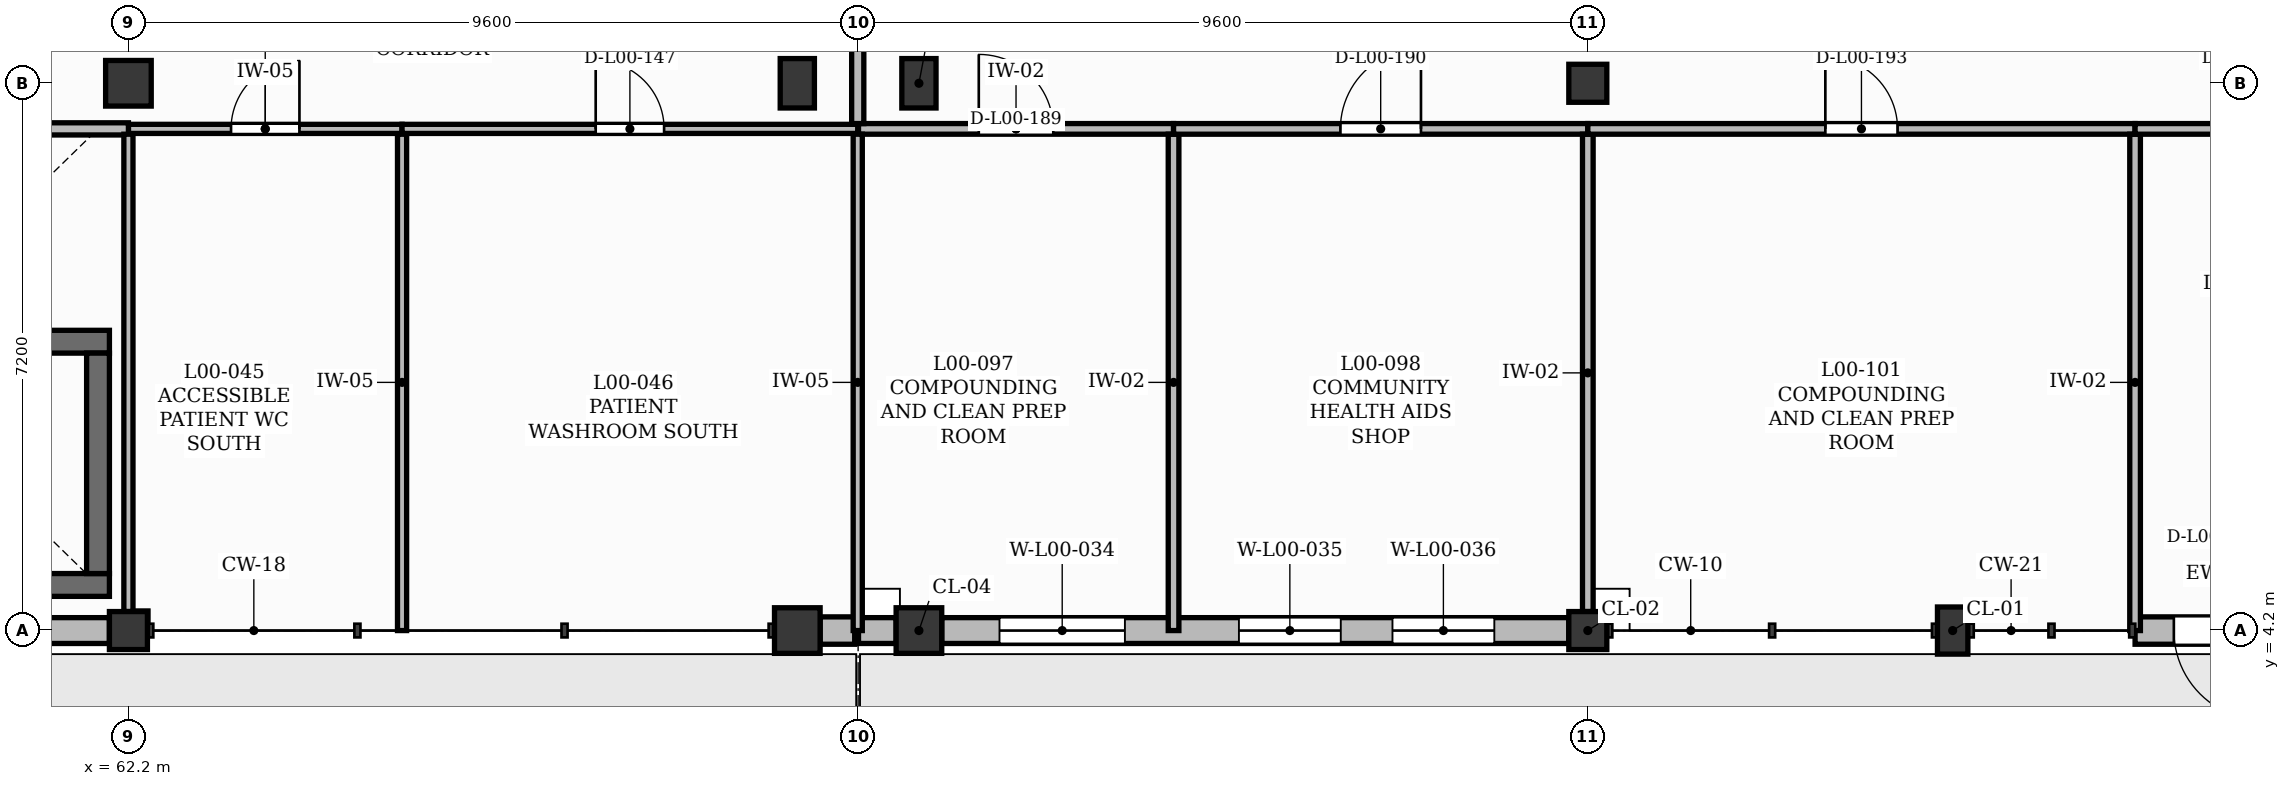
"""IFC4 building model, lengths in metres.
Left out: names, types, materials, properties, quantities, classifications, styles, units other than length and angle.
Written with IfcOpenShell. Run it as: python <this file> out.ifc"""

import sys

from ifc_helpers import new_model, si_unit, direction, frame, frame_2d, origin, origin_2d, place, context, subcontext, project, spatial, rectangle, extrude, element, fill, save


model = new_model("IFC4")
c1 = context("Model", 3, precision=1e-05, world=origin(), true_north=direction((0.0, 1.0)))
c2 = subcontext(c1, "Body", "Model", "MODEL_VIEW")
j1 = project(units=[si_unit("LENGTHUNIT", "METRE"), si_unit("PLANEANGLEUNIT", "RADIAN")], contexts=[c1])
p1 = place(None, origin())
s1 = spatial("IfcSite", under=j1, at=p1, CompositionType="ELEMENT")
p2 = place(p1, origin())
s2 = spatial("IfcBuilding", under=s1, at=p2, CompositionType="ELEMENT")
p3 = place(p2, origin())
s3 = spatial("IfcBuildingStorey", under=s2, at=p3, CompositionType="ELEMENT", Elevation=0.0)
p4 = place(p3, frame((72.6, 4.2, 0.0), z_axis=(0.0, 0.0, 1.0), x_axis=(1.0, 0.0, 0.0)))
e1 = element("IfcColumn", 1, at=p4, inside=s3, PredefinedType="COLUMN", context=c2, shape_type="SweptSolid", body=[
    extrude(rectangle(XDim=0.6, YDim=0.6, at=origin_2d()), origin(), (0.0, 0.0, 1.0), 4.2),
])
p5 = place(p3, frame((72.6, 11.4, 0.0), z_axis=(0.0, 0.0, 1.0), x_axis=(1.0, 0.0, 0.0)))
e2 = element("IfcColumn", 2, at=p5, inside=s3, PredefinedType="COLUMN", context=c2, shape_type="SweptSolid", body=[
    extrude(rectangle(XDim=0.45, YDim=0.65, at=origin_2d()), origin(), (0.0, 0.0, 1.0), 4.2),
])
for number, where, z_axis, x_axis in (
    (3, (81.4, 4.2, 0.0), (0.0, 0.0, 1.0), (1.0, 0.0, 0.0)),
    (4, (81.4, 11.4, 0.0), (0.0, 0.0, 1.0), (1.0, 0.0, 0.0)),
    (5, (62.2, 4.2, 0.0), (0.0, 0.0, 1.0), (1.0, 0.0, 0.0)),
):
    element("IfcColumn", number, at=place(p3, frame(where, z_axis=z_axis, x_axis=x_axis)), inside=s3, PredefinedType="COLUMN", context=c2, shape_type="SweptSolid", body=[
        extrude(rectangle(XDim=0.5, YDim=0.5, at=origin_2d()), origin(), (0.0, 0.0, 1.0), 4.2),
    ])
for number, where, z_axis, x_axis in (
    (6, (62.2, 11.4, 0.0), (0.0, 0.0, 1.0), (1.0, 0.0, 0.0)),
    (7, (71.0, 4.2, 0.0), (0.0, 0.0, 1.0), (1.0, 0.0, 0.0)),
):
    element("IfcColumn", number, at=place(p3, frame(where, z_axis=z_axis, x_axis=x_axis)), inside=s3, PredefinedType="COLUMN", context=c2, shape_type="SweptSolid", body=[
        extrude(rectangle(XDim=0.6, YDim=0.6, at=origin_2d()), origin(), (0.0, 0.0, 1.0), 4.2),
    ])
p6 = place(p3, frame((71.0, 11.4, 0.0), z_axis=(0.0, 0.0, 1.0), x_axis=(1.0, 0.0, 0.0)))
e8 = element("IfcColumn", 8, at=p6, inside=s3, PredefinedType="COLUMN", context=c2, shape_type="SweptSolid", body=[
    extrude(rectangle(XDim=0.45, YDim=0.65, at=origin_2d()), origin(), (0.0, 0.0, 1.0), 4.2),
])
p7 = place(p3, frame((86.2, 4.2, 0.0), z_axis=(0.0, 0.0, 1.0), x_axis=(1.0, 0.0, 0.0)))
e9 = element("IfcColumn", 9, at=p7, inside=s3, PredefinedType="PILASTER", context=c2, shape_type="SweptSolid", body=[
    extrude(rectangle(XDim=0.4, YDim=0.62, at=origin_2d()), origin(), (0.0, 0.0, 1.0), 4.2),
])
p8 = place(p3, frame((58.775, 4.2, 0.0), z_axis=(0.0, 0.0, 1.0), x_axis=(1.0, 0.0, 0.0)))
e10 = element("IfcWall", 10, at=p8, inside=s3, PredefinedType="SOLIDWALL", context=c2, shape_type="SweptSolid", body=[
    extrude(rectangle(XDim=3.175, YDim=0.34, at=frame_2d((1.587, 0.0))), origin(), (0.0, 0.0, 1.0), 3.68),
])
p9 = place(p3, frame((71.3, 4.2, 0.0), z_axis=(0.0, 0.0, 1.0), x_axis=(1.0, 0.0, 0.0)))
e11 = element("IfcWall", 11, at=p9, inside=s3, PredefinedType="SOLIDWALL", context=c2, shape_type="SweptSolid", body=[
    extrude(rectangle(XDim=0.455, YDim=0.36, at=frame_2d((0.228, 0.0))), origin(), (0.0, 0.0, 1.0), 4.2),
])
p10 = place(p3, frame((71.805, 4.2, 0.0), z_axis=(0.0, 0.0, 1.0), x_axis=(1.0, 0.0, 0.0)))
e12 = element("IfcWall", 12, at=p10, inside=s3, PredefinedType="SOLIDWALL", context=c2, shape_type="SweptSolid", body=[
    extrude(rectangle(XDim=0.495, YDim=0.34, at=frame_2d((0.248, 0.0))), origin(), (0.0, 0.0, 1.0), 4.2),
])
p11 = place(p3, frame((72.9, 4.2, 0.0), z_axis=(0.0, 0.0, 1.0), x_axis=(1.0, 0.0, 0.0)))
e13 = element("IfcWall", 13, at=p11, inside=s3, PredefinedType="SOLIDWALL", context=c2, shape_type="SweptSolid", body=[
    extrude(rectangle(XDim=8.25, YDim=0.34, at=frame_2d((4.125, 0.0))), origin(), (0.0, 0.0, 1.0), 3.68),
])
p12 = place(p11, frame((0.76, 0.0, 1.35)))
e14 = element("IfcOpeningElement", 14, at=p12, cuts=e13, PredefinedType="OPENING", context=c2, shape_type="SweptSolid", body=[
    extrude(rectangle(XDim=1.65, YDim=1.4, at=frame_2d((0.825, 0.7))), frame((0.0, 0.18, 0.0), z_axis=(0.0, -1.0, 0.0), x_axis=(1.0, 0.0, 0.0)), (0.0, 0.0, 1.0), 0.36),
])
p13 = place(p11, frame((3.91, 0.0, 1.0)))
e15 = element("IfcOpeningElement", 15, at=p13, cuts=e13, PredefinedType="OPENING", context=c2, shape_type="SweptSolid", body=[
    extrude(rectangle(XDim=1.34, YDim=1.95, at=frame_2d((0.67, 0.975))), frame((0.0, 0.18, 0.0), z_axis=(0.0, -1.0, 0.0), x_axis=(1.0, 0.0, 0.0)), (0.0, 0.0, 1.0), 0.36),
])
p14 = place(p11, frame((5.93, 0.0, 1.0)))
e16 = element("IfcOpeningElement", 16, at=p14, cuts=e13, PredefinedType="OPENING", context=c2, shape_type="SweptSolid", body=[
    extrude(rectangle(XDim=1.34, YDim=1.95, at=frame_2d((0.67, 0.975))), frame((0.0, 0.18, 0.0), z_axis=(0.0, -1.0, 0.0), x_axis=(1.0, 0.0, 0.0)), (0.0, 0.0, 1.0), 0.36),
])
p15 = place(p3, frame((88.6, 4.2, 0.0), z_axis=(0.0, 0.0, 1.0), x_axis=(1.0, 0.0, 0.0)))
e17 = element("IfcWall", 17, at=p15, inside=s3, PredefinedType="SOLIDWALL", context=c2, shape_type="SweptSolid", body=[
    extrude(rectangle(XDim=2.175, YDim=0.36, at=frame_2d((1.087, 0.0))), origin(), (0.0, 0.0, 1.0), 3.68),
])
p16 = place(p15, frame((0.51, 0.0, 0.0)))
e18 = element("IfcOpeningElement", 18, at=p16, cuts=e17, PredefinedType="OPENING", context=c2, shape_type="SweptSolid", body=[
    extrude(rectangle(XDim=1.18, YDim=2.2, at=frame_2d((0.59, 1.1))), frame((0.0, 0.19, 0.0), z_axis=(0.0, -1.0, 0.0), x_axis=(1.0, 0.0, 0.0)), (0.0, 0.0, 1.0), 0.38),
])
for number, where, z_axis, x_axis in (
    (19, (55.25, 4.8, 0.0), (0.0, 0.0, 1.0), (1.0, 0.0, 0.0)),
    (20, (55.25, 8.0, 0.0), (0.0, 0.0, 1.0), (1.0, 0.0, 0.0)),
):
    element("IfcWall", number, at=place(p3, frame(where, z_axis=z_axis, x_axis=x_axis)), inside=s3, PredefinedType="SHEAR", context=c2, shape_type="SweptSolid", body=[
        extrude(rectangle(XDim=6.7, YDim=0.3, at=frame_2d((3.35, 0.0))), origin(), (0.0, 0.0, 1.0), 4.25),
    ])
p17 = place(p3, frame((61.8, 4.95, 0.0), z_axis=(0.0, 0.0, 1.0), x_axis=(0.0, 1.0, 0.0)))
e21 = element("IfcWall", 21, at=p17, inside=s3, PredefinedType="SHEAR", context=c2, shape_type="SweptSolid", body=[
    extrude(rectangle(XDim=2.9, YDim=0.3, at=frame_2d((1.45, 0.0))), origin(), (0.0, 0.0, 1.0), 4.25),
])
p18 = place(p3, frame((62.2, 10.8, 0.0), z_axis=(0.0, 0.0, 1.0), x_axis=(1.0, 0.0, 0.0)))
e22 = element("IfcWall", 22, at=p18, inside=s3, PredefinedType="PLUMBINGWALL", context=c2, shape_type="SweptSolid", body=[
    extrude(rectangle(XDim=3.6, YDim=0.12, at=frame_2d((1.8, 0.0))), origin(), (0.0, 0.0, 1.0), 4.18),
])
p19 = place(p18, frame((1.35, 0.0, 0.0)))
e23 = element("IfcOpeningElement", 23, at=p19, cuts=e22, PredefinedType="OPENING", context=c2, shape_type="SweptSolid", body=[
    extrude(rectangle(XDim=0.9, YDim=2.1, at=frame_2d((0.45, 1.05))), frame((0.0, 0.07, 0.0), z_axis=(0.0, -1.0, 0.0), x_axis=(1.0, 0.0, 0.0)), (0.0, 0.0, 1.0), 0.14),
])
p20 = place(p3, frame((65.8, 4.2, 0.0), z_axis=(0.0, 0.0, 1.0), x_axis=(0.0, 1.0, 0.0)))
e24 = element("IfcWall", 24, at=p20, inside=s3, PredefinedType="PLUMBINGWALL", context=c2, shape_type="SweptSolid", body=[
    extrude(rectangle(XDim=6.53, YDim=0.12, at=frame_2d((3.265, 0.0))), origin(), (0.0, 0.0, 1.0), 4.18),
])
p21 = place(p3, frame((65.8, 10.8, 0.0), z_axis=(0.0, 0.0, 1.0), x_axis=(1.0, 0.0, 0.0)))
e25 = element("IfcWall", 25, at=p21, inside=s3, PredefinedType="PLUMBINGWALL", context=c2, shape_type="SweptSolid", body=[
    extrude(rectangle(XDim=5.995, YDim=0.12, at=frame_2d((2.998, 0.0))), origin(), (0.0, 0.0, 1.0), 4.18),
])
p22 = place(p21, frame((2.548, 0.0, 0.0)))
e26 = element("IfcOpeningElement", 26, at=p22, cuts=e25, PredefinedType="OPENING", context=c2, shape_type="SweptSolid", body=[
    extrude(rectangle(XDim=0.9, YDim=2.1, at=frame_2d((0.45, 1.05))), frame((0.0, 0.07, 0.0), z_axis=(0.0, -1.0, 0.0), x_axis=(1.0, 0.0, 0.0)), (0.0, 0.0, 1.0), 0.14),
])
p23 = place(p3, frame((71.805, 10.8, 0.0), z_axis=(0.0, 0.0, 1.0), x_axis=(1.0, 0.0, 0.0)))
e27 = element("IfcWall", 27, at=p23, inside=s3, PredefinedType="PARTITIONING", context=c2, shape_type="SweptSolid", body=[
    extrude(rectangle(XDim=4.145, YDim=0.14, at=frame_2d((2.073, 0.0))), origin(), (0.0, 0.0, 1.0), 4.18),
])
p24 = place(p23, frame((1.583, 0.0, 0.0)))
e28 = element("IfcOpeningElement", 28, at=p24, cuts=e27, PredefinedType="OPENING", context=c2, shape_type="SweptSolid", body=[
    extrude(rectangle(XDim=0.98, YDim=2.15, at=frame_2d((0.49, 1.075))), frame((0.0, 0.08, 0.0), z_axis=(0.0, -1.0, 0.0), x_axis=(1.0, 0.0, 0.0)), (0.0, 0.0, 1.0), 0.16),
])
p25 = place(p3, frame((75.95, 4.2, 0.0), z_axis=(0.0, 0.0, 1.0), x_axis=(0.0, 1.0, 0.0)))
e29 = element("IfcWall", 29, at=p25, inside=s3, PredefinedType="PARTITIONING", context=c2, shape_type="SweptSolid", body=[
    extrude(rectangle(XDim=6.53, YDim=0.14, at=frame_2d((3.265, 0.0))), origin(), (0.0, 0.0, 1.0), 4.18),
])
p26 = place(p3, frame((75.95, 10.8, 0.0), z_axis=(0.0, 0.0, 1.0), x_axis=(1.0, 0.0, 0.0)))
e30 = element("IfcWall", 30, at=p26, inside=s3, PredefinedType="PARTITIONING", context=c2, shape_type="SweptSolid", body=[
    extrude(rectangle(XDim=5.45, YDim=0.14, at=frame_2d((2.725, 0.0))), origin(), (0.0, 0.0, 1.0), 4.18),
])
p27 = place(p26, frame((2.195, 0.0, 0.0)))
e31 = element("IfcOpeningElement", 31, at=p27, cuts=e30, PredefinedType="OPENING", context=c2, shape_type="SweptSolid", body=[
    extrude(rectangle(XDim=1.06, YDim=2.15, at=frame_2d((0.53, 1.075))), frame((0.0, 0.08, 0.0), z_axis=(0.0, -1.0, 0.0), x_axis=(1.0, 0.0, 0.0)), (0.0, 0.0, 1.0), 0.16),
])
p28 = place(p3, frame((81.4, 4.45, 0.0), z_axis=(0.0, 0.0, 1.0), x_axis=(0.0, 1.0, 0.0)))
e32 = element("IfcWall", 32, at=p28, inside=s3, PredefinedType="PARTITIONING", context=c2, shape_type="SweptSolid", body=[
    extrude(rectangle(XDim=6.28, YDim=0.14, at=frame_2d((3.14, 0.0))), origin(), (0.0, 0.0, 1.0), 3.5),
])
p29 = place(p3, frame((81.4, 10.8, 0.0), z_axis=(0.0, 0.0, 1.0), x_axis=(1.0, 0.0, 0.0)))
e33 = element("IfcWall", 33, at=p29, inside=s3, PredefinedType="PARTITIONING", context=c2, shape_type="SweptSolid", body=[
    extrude(rectangle(XDim=7.2, YDim=0.14, at=frame_2d((3.6, 0.0))), origin(), (0.0, 0.0, 1.0), 4.18),
])
p30 = place(p29, frame((3.125, 0.0, 0.0)))
e34 = element("IfcOpeningElement", 34, at=p30, cuts=e33, PredefinedType="OPENING", context=c2, shape_type="SweptSolid", body=[
    extrude(rectangle(XDim=0.95, YDim=2.1, at=frame_2d((0.475, 1.05))), frame((0.0, 0.08, 0.0), z_axis=(0.0, -1.0, 0.0), x_axis=(1.0, 0.0, 0.0)), (0.0, 0.0, 1.0), 0.16),
])
p31 = place(p3, frame((88.6, 4.2, 0.0), z_axis=(0.0, 0.0, 1.0), x_axis=(0.0, 1.0, 0.0)))
e35 = element("IfcWall", 35, at=p31, inside=s3, PredefinedType="PARTITIONING", context=c2, shape_type="SweptSolid", body=[
    extrude(rectangle(XDim=6.53, YDim=0.14, at=frame_2d((3.265, 0.0))), origin(), (0.0, 0.0, 1.0), 3.9),
])
p32 = place(p3, frame((88.6, 10.8, 0.0), z_axis=(0.0, 0.0, 1.0), x_axis=(1.0, 0.0, 0.0)))
e36 = element("IfcWall", 36, at=p32, inside=s3, PredefinedType="PARTITIONING", context=c2, shape_type="SweptSolid", body=[
    extrude(rectangle(XDim=3.4, YDim=0.14, at=frame_2d((1.7, 0.0))), origin(), (0.0, 0.0, 1.0), 4.18),
])
p33 = place(p32, frame((1.03, 0.0, 0.0)))
e37 = element("IfcOpeningElement", 37, at=p33, cuts=e36, PredefinedType="OPENING", context=c2, shape_type="SweptSolid", body=[
    extrude(rectangle(XDim=0.9, YDim=2.1, at=frame_2d((0.45, 1.05))), frame((0.0, 0.08, 0.0), z_axis=(0.0, -1.0, 0.0), x_axis=(1.0, 0.0, 0.0)), (0.0, 0.0, 1.0), 0.16),
])
p34 = place(p3, frame((59.4, 10.8, 0.0), z_axis=(0.0, 0.0, 1.0), x_axis=(1.0, 0.0, 0.0)))
e38 = element("IfcWall", 38, at=p34, inside=s3, PredefinedType="PARTITIONING", context=c2, shape_type="SweptSolid", body=[
    extrude(rectangle(XDim=2.8, YDim=0.16, at=frame_2d((1.4, 0.0))), origin(), (0.0, 0.0, 1.0), 4.18),
])
p35 = place(p3, frame((71.795, 10.87, 0.0), z_axis=(0.0, 0.0, 1.0), x_axis=(0.0, 1.0, 0.0)))
e39 = element("IfcWall", 39, at=p35, inside=s3, PredefinedType="PARTITIONING", context=c2, shape_type="SweptSolid", body=[
    extrude(rectangle(XDim=2.46, YDim=0.16, at=frame_2d((1.23, 0.0))), origin(), (0.0, 0.0, 1.0), 4.18),
])
p36 = place(p3, frame((62.2, 4.45, 0.0), z_axis=(0.0, 0.0, 1.0), x_axis=(0.0, 1.0, 0.0)))
e40 = element("IfcWall", 40, at=p36, inside=s3, PredefinedType="PLUMBINGWALL", context=c2, shape_type="SweptSolid", body=[
    extrude(rectangle(XDim=6.28, YDim=0.12, at=frame_2d((3.14, 0.0))), origin(), (0.0, 0.0, 1.0), 3.5),
])
p37 = place(p3, frame((71.795, 4.2, 0.0), z_axis=(0.0, 0.0, 1.0), x_axis=(0.0, 1.0, 0.0)))
e41 = element("IfcWall", 41, at=p37, inside=s3, PredefinedType="PLUMBINGWALL", context=c2, shape_type="SweptSolid", body=[
    extrude(rectangle(XDim=6.53, YDim=0.12, at=frame_2d((3.265, 0.0))), origin(), (0.0, 0.0, 1.0), 4.18),
])
p38 = place(p12, origin())
e42 = element("IfcWindow", 42, at=p38, inside=s3, PartitioningType="DOUBLE_PANEL_VERTICAL", PredefinedType="WINDOW", context=c2, shape_type="SweptSolid", body=[
    extrude(rectangle(XDim=1.65, YDim=1.4, at=frame_2d((0.825, 0.7))), frame((0.0, 0.03, 0.0), z_axis=(0.0, -1.0, 0.0), x_axis=(1.0, 0.0, 0.0)), (0.0, 0.0, 1.0), 0.06),
])
fill(e14, e42)
p39 = place(p13, origin())
e43 = element("IfcWindow", 43, at=p39, inside=s3, PartitioningType="SINGLE_PANEL", PredefinedType="WINDOW", context=c2, shape_type="SweptSolid", body=[
    extrude(rectangle(XDim=1.34, YDim=1.95, at=frame_2d((0.67, 0.975))), frame((0.0, 0.03, 0.0), z_axis=(0.0, -1.0, 0.0), x_axis=(1.0, 0.0, 0.0)), (0.0, 0.0, 1.0), 0.06),
])
fill(e15, e43)
p40 = place(p14, origin())
e44 = element("IfcWindow", 44, at=p40, inside=s3, PartitioningType="SINGLE_PANEL", PredefinedType="WINDOW", context=c2, shape_type="SweptSolid", body=[
    extrude(rectangle(XDim=1.34, YDim=1.95, at=frame_2d((0.67, 0.975))), frame((0.0, 0.03, 0.0), z_axis=(0.0, -1.0, 0.0), x_axis=(1.0, 0.0, 0.0)), (0.0, 0.0, 1.0), 0.06),
])
fill(e16, e44)
p41 = place(p16, frame((1.18, 0.0, 0.0), z_axis=(0.0, 0.0, 1.0), x_axis=(-1.0, 0.0, 0.0)))
e45 = element("IfcDoor", 45, at=p41, inside=s3, OperationType="SINGLE_SWING_LEFT", PredefinedType="DOOR", context=c2, shape_type="SweptSolid", body=[
    extrude(rectangle(XDim=1.18, YDim=2.2, at=frame_2d((0.59, 1.1))), frame((0.0, 0.025, 0.0), z_axis=(0.0, -1.0, 0.0), x_axis=(1.0, 0.0, 0.0)), (0.0, 0.0, 1.0), 0.05),
])
fill(e18, e45)
p42 = place(p19, origin())
e46 = element("IfcDoor", 46, at=p42, inside=s3, OperationType="SINGLE_SWING_RIGHT", PredefinedType="DOOR", context=c2, shape_type="SweptSolid", body=[
    extrude(rectangle(XDim=0.9, YDim=2.1, at=frame_2d((0.45, 1.05))), frame((0.0, 0.025, 0.0), z_axis=(0.0, -1.0, 0.0), x_axis=(1.0, 0.0, 0.0)), (0.0, 0.0, 1.0), 0.05),
])
fill(e23, e46)
p43 = place(p22, origin())
e47 = element("IfcDoor", 47, at=p43, inside=s3, OperationType="SINGLE_SWING_LEFT", PredefinedType="DOOR", context=c2, shape_type="SweptSolid", body=[
    extrude(rectangle(XDim=0.9, YDim=2.1, at=frame_2d((0.45, 1.05))), frame((0.0, 0.025, 0.0), z_axis=(0.0, -1.0, 0.0), x_axis=(1.0, 0.0, 0.0)), (0.0, 0.0, 1.0), 0.05),
])
fill(e26, e47)
p44 = place(p24, origin())
e48 = element("IfcDoor", 48, at=p44, inside=s3, OperationType="SINGLE_SWING_LEFT", PredefinedType="DOOR", context=c2, shape_type="SweptSolid", body=[
    extrude(rectangle(XDim=0.98, YDim=2.15, at=frame_2d((0.49, 1.075))), frame((0.0, 0.025, 0.0), z_axis=(0.0, -1.0, 0.0), x_axis=(1.0, 0.0, 0.0)), (0.0, 0.0, 1.0), 0.05),
])
fill(e28, e48)
p45 = place(p27, origin())
e49 = element("IfcDoor", 49, at=p45, inside=s3, OperationType="SINGLE_SWING_RIGHT", PredefinedType="DOOR", context=c2, shape_type="SweptSolid", body=[
    extrude(rectangle(XDim=1.06, YDim=2.15, at=frame_2d((0.53, 1.075))), frame((0.0, 0.025, 0.0), z_axis=(0.0, -1.0, 0.0), x_axis=(1.0, 0.0, 0.0)), (0.0, 0.0, 1.0), 0.05),
])
fill(e31, e49)
p46 = place(p30, origin())
e50 = element("IfcDoor", 50, at=p46, inside=s3, OperationType="SINGLE_SWING_LEFT", PredefinedType="DOOR", context=c2, shape_type="SweptSolid", body=[
    extrude(rectangle(XDim=0.95, YDim=2.1, at=frame_2d((0.475, 1.05))), frame((0.0, 0.025, 0.0), z_axis=(0.0, -1.0, 0.0), x_axis=(1.0, 0.0, 0.0)), (0.0, 0.0, 1.0), 0.05),
])
fill(e34, e50)
save(model, sys.argv[1])
